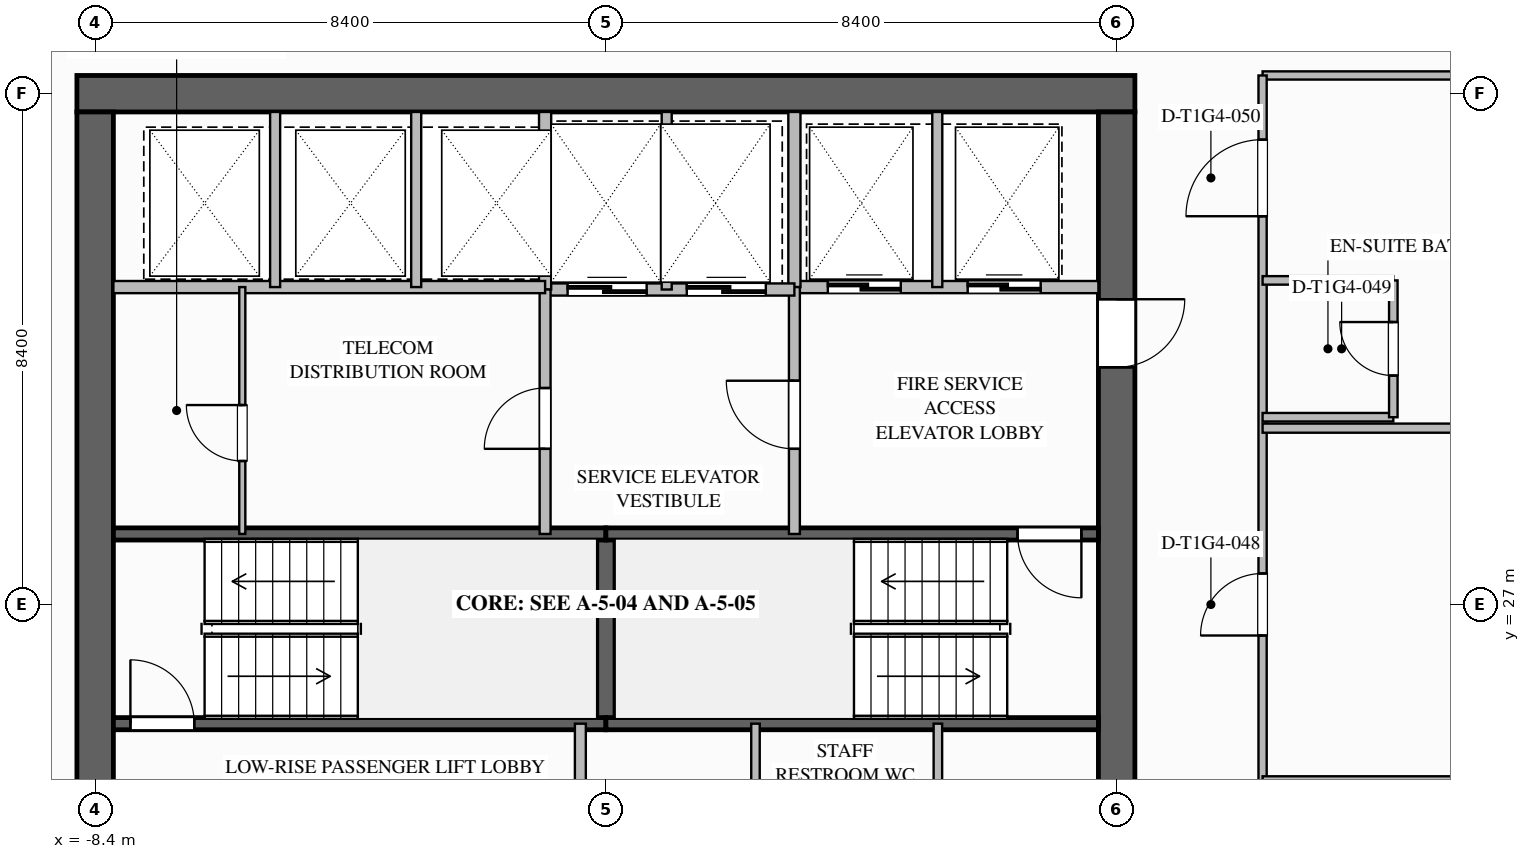
"""IFC4 building model, lengths in metres.
Left out: names, types, materials, properties, quantities, classifications, styles, units other than length and angle.
Written with IfcOpenShell. Run it as: python <this file> out.ifc"""

import sys

from ifc_helpers import new_model, si_unit, direction, frame, frame_2d, origin, place, context, subcontext, project, spatial, rectangle, extrude, element, fill, save


model = new_model("IFC4")
c1 = context("Model", 3, precision=1e-05, world=origin(), true_north=direction((0.0, 1.0)))
c2 = subcontext(c1, "Body", "Model", "MODEL_VIEW")
j1 = project(units=[si_unit("LENGTHUNIT", "METRE"), si_unit("PLANEANGLEUNIT", "RADIAN")], contexts=[c1])
p1 = place(None, origin())
s1 = spatial("IfcSite", under=j1, at=p1, CompositionType="ELEMENT")
p2 = place(p1, origin())
s2 = spatial("IfcBuilding", under=s1, at=p2, CompositionType="ELEMENT")
p3 = place(p2, frame((0.0, 0.0, 64.7)))
s3 = spatial("IfcBuildingStorey", under=s2, at=p3, CompositionType="ELEMENT", Elevation=64.7)
p4 = place(p3, frame((-8.7, 35.4, 0.0), z_axis=(0.0, 0.0, 1.0), x_axis=(1.0, 0.0, 0.0)))
e1 = element("IfcWall", 1, at=p4, inside=s3, PredefinedType="SHEAR", context=c2, shape_type="SweptSolid", body=[
    extrude(rectangle(XDim=17.4, YDim=0.6, at=frame_2d((8.7, 0.0))), origin(), (0.0, 0.0, 1.0), 3.5),
])
p5 = place(p3, frame((8.4, 35.1, 0.0), z_axis=(0.0, 0.0, 1.0), x_axis=(0.0, -1.0, 0.0)))
e2 = element("IfcWall", 2, at=p5, inside=s3, PredefinedType="SHEAR", context=c2, shape_type="SweptSolid", body=[
    extrude(rectangle(XDim=16.2, YDim=0.6, at=frame_2d((8.1, 0.0))), origin(), (0.0, 0.0, 1.0), 3.5),
])
p6 = place(p5, frame((3.08, 0.0, 0.0)))
e3 = element("IfcOpeningElement", 3, at=p6, cuts=e2, PredefinedType="OPENING", context=c2, shape_type="SweptSolid", body=[
    extrude(rectangle(XDim=1.12, YDim=2.1, at=frame_2d((0.56, 1.05))), frame((0.0, 0.31, 0.0), z_axis=(0.0, -1.0, 0.0), x_axis=(1.0, 0.0, 0.0)), (0.0, 0.0, 1.0), 0.62),
])
p7 = place(p3, frame((-8.4, 18.9, 0.0), z_axis=(0.0, 0.0, 1.0), x_axis=(0.0, 1.0, 0.0)))
e4 = element("IfcWall", 4, at=p7, inside=s3, PredefinedType="SHEAR", context=c2, shape_type="SweptSolid", body=[
    extrude(rectangle(XDim=16.2, YDim=0.6, at=frame_2d((8.1, 0.0))), origin(), (0.0, 0.0, 1.0), 3.5),
])
p8 = place(p7, frame((3.9, 0.0, 0.0)))
e5 = element("IfcOpeningElement", 5, at=p8, cuts=e4, PredefinedType="OPENING", context=c2, shape_type="SweptSolid", body=[
    extrude(rectangle(XDim=1.08, YDim=2.04, at=frame_2d((0.54, 1.02))), frame((0.0, 0.31, 0.0), z_axis=(0.0, -1.0, 0.0), x_axis=(1.0, 0.0, 0.0)), (0.0, 0.0, 1.0), 0.62),
])
p9 = place(p3, frame((0.0, 25.04, 0.0), z_axis=(0.0, 0.0, 1.0), x_axis=(0.0, 1.0, 0.0)))
e6 = element("IfcWall", 6, at=p9, inside=s3, PredefinedType="SOLIDWALL", context=c2, shape_type="SweptSolid", body=[
    extrude(rectangle(XDim=3.12, YDim=0.3, at=frame_2d((1.56, 0.0))), origin(), (0.0, 0.0, 1.0), 3.24),
])
p10 = place(p3, frame((-8.1, 25.04, 0.0), z_axis=(0.0, 0.0, 1.0), x_axis=(1.0, 0.0, 0.0)))
e7 = element("IfcWall", 7, at=p10, inside=s3, PredefinedType="SOLIDWALL", context=c2, shape_type="SweptSolid", body=[
    extrude(rectangle(XDim=8.1, YDim=0.2, at=frame_2d((4.05, 0.0))), origin(), (0.0, 0.0, 1.0), 3.24),
])
p11 = place(p10, frame((0.28, 0.0, 0.0)))
e8 = element("IfcOpeningElement", 8, at=p11, cuts=e7, PredefinedType="OPENING", context=c2, shape_type="SweptSolid", body=[
    extrude(rectangle(XDim=1.05, YDim=2.1, at=frame_2d((0.525, 1.05))), frame((0.0, 0.11, 0.0), z_axis=(0.0, -1.0, 0.0), x_axis=(1.0, 0.0, 0.0)), (0.0, 0.0, 1.0), 0.22),
])
for number, where, z_axis, x_axis in (
    (9, (-8.1, 28.16, 0.0), (0.0, 0.0, 1.0), (1.0, 0.0, 0.0)),
    (10, (0.0, 25.04, 0.0), (0.0, 0.0, 1.0), (1.0, 0.0, 0.0)),
):
    element("IfcWall", number, at=place(p3, frame(where, z_axis=z_axis, x_axis=x_axis)), inside=s3, PredefinedType="SOLIDWALL", context=c2, shape_type="SweptSolid", body=[
        extrude(rectangle(XDim=8.1, YDim=0.2, at=frame_2d((4.05, 0.0))), origin(), (0.0, 0.0, 1.0), 3.24),
    ])
p12 = place(p3, frame((8.1, 28.16, 0.0), z_axis=(0.0, 0.0, 1.0), x_axis=(-1.0, 0.0, 0.0)))
e11 = element("IfcWall", 11, at=p12, inside=s3, PredefinedType="SOLIDWALL", context=c2, shape_type="SweptSolid", body=[
    extrude(rectangle(XDim=8.1, YDim=0.2, at=frame_2d((4.05, 0.0))), origin(), (0.0, 0.0, 1.0), 3.24),
])
p13 = place(p12, frame((0.28, 0.0, 0.0)))
e12 = element("IfcOpeningElement", 12, at=p13, cuts=e11, PredefinedType="OPENING", context=c2, shape_type="SweptSolid", body=[
    extrude(rectangle(XDim=1.05, YDim=2.1, at=frame_2d((0.525, 1.05))), frame((0.0, 0.11, 0.0), z_axis=(0.0, -1.0, 0.0), x_axis=(1.0, 0.0, 0.0)), (0.0, 0.0, 1.0), 0.22),
])
p14 = place(p3, frame((3.1, 32.22, 0.0), z_axis=(0.0, 0.0, 1.0), x_axis=(1.0, 0.0, 0.0)))
e13 = element("IfcWall", 13, at=p14, inside=s3, PredefinedType="SOLIDWALL", context=c2, shape_type="SweptSolid", body=[
    extrude(rectangle(XDim=5.0, YDim=0.2, at=frame_2d((2.5, 0.0))), origin(), (0.0, 0.0, 1.0), 3.24),
])
p15 = place(p14, frame((0.55, 0.0, 0.0)))
e14 = element("IfcOpeningElement", 14, at=p15, cuts=e13, PredefinedType="OPENING", context=c2, shape_type="SweptSolid", body=[
    extrude(rectangle(XDim=1.2, YDim=2.2, at=frame_2d((0.6, 1.1))), frame((0.0, 0.11, 0.0), z_axis=(0.0, -1.0, 0.0), x_axis=(1.0, 0.0, 0.0)), (0.0, 0.0, 1.0), 0.22),
])
p16 = place(p14, frame((2.85, 0.0, 0.0)))
e15 = element("IfcOpeningElement", 15, at=p16, cuts=e13, PredefinedType="OPENING", context=c2, shape_type="SweptSolid", body=[
    extrude(rectangle(XDim=1.2, YDim=2.2, at=frame_2d((0.6, 1.1))), frame((0.0, 0.11, 0.0), z_axis=(0.0, -1.0, 0.0), x_axis=(1.0, 0.0, 0.0)), (0.0, 0.0, 1.0), 0.22),
])
p17 = place(p3, frame((3.1, 32.22, 0.0), z_axis=(0.0, 0.0, 1.0), x_axis=(0.0, 1.0, 0.0)))
e16 = element("IfcWall", 16, at=p17, inside=s3, PredefinedType="SOLIDWALL", context=c2, shape_type="SweptSolid", body=[
    extrude(rectangle(XDim=2.88, YDim=0.2, at=frame_2d((1.44, 0.0))), origin(), (0.0, 0.0, 1.0), 3.24),
])
p18 = place(p3, frame((5.45, 32.22, 0.0), z_axis=(0.0, 0.0, 1.0), x_axis=(0.0, 1.0, 0.0)))
e17 = element("IfcWall", 17, at=p18, inside=s3, PredefinedType="PARTITIONING", context=c2, shape_type="SweptSolid", body=[
    extrude(rectangle(XDim=2.88, YDim=0.165, at=frame_2d((1.44, 0.0))), origin(), (0.0, 0.0, 1.0), 3.24),
])
p19 = place(p3, frame((3.1, 28.16, 0.0), z_axis=(0.0, 0.0, 1.0), x_axis=(0.0, 1.0, 0.0)))
e18 = element("IfcWall", 18, at=p19, inside=s3, PredefinedType="SOLIDWALL", context=c2, shape_type="SweptSolid", body=[
    extrude(rectangle(XDim=4.06, YDim=0.18, at=frame_2d((2.03, 0.0))), origin(), (0.0, 0.0, 1.0), 3.24),
])
p20 = place(p19, frame((1.4, 0.0, 0.0)))
e19 = element("IfcOpeningElement", 19, at=p20, cuts=e18, PredefinedType="OPENING", context=c2, shape_type="SweptSolid", body=[
    extrude(rectangle(XDim=1.12, YDim=2.1, at=frame_2d((0.56, 1.05))), frame((0.0, 0.1, 0.0), z_axis=(0.0, -1.0, 0.0), x_axis=(1.0, 0.0, 0.0)), (0.0, 0.0, 1.0), 0.2),
])
p21 = place(p3, frame((-1.0, 32.18, 0.0), z_axis=(0.0, 0.0, 1.0), x_axis=(1.0, 0.0, 0.0)))
e20 = element("IfcWall", 20, at=p21, inside=s3, PredefinedType="SOLIDWALL", context=c2, shape_type="SweptSolid", body=[
    extrude(rectangle(XDim=4.1, YDim=0.2, at=frame_2d((2.05, 0.0))), origin(), (0.0, 0.0, 1.0), 3.24),
])
p22 = place(p21, frame((0.37, 0.0, 0.0)))
e21 = element("IfcOpeningElement", 21, at=p22, cuts=e20, PredefinedType="OPENING", context=c2, shape_type="SweptSolid", body=[
    extrude(rectangle(XDim=1.3, YDim=2.2, at=frame_2d((0.65, 1.1))), frame((0.0, 0.11, 0.0), z_axis=(0.0, -1.0, 0.0), x_axis=(1.0, 0.0, 0.0)), (0.0, 0.0, 1.0), 0.22),
])
p23 = place(p21, frame((2.33, 0.0, 0.0)))
e22 = element("IfcOpeningElement", 22, at=p23, cuts=e20, PredefinedType="OPENING", context=c2, shape_type="SweptSolid", body=[
    extrude(rectangle(XDim=1.3, YDim=2.2, at=frame_2d((0.65, 1.1))), frame((0.0, 0.11, 0.0), z_axis=(0.0, -1.0, 0.0), x_axis=(1.0, 0.0, 0.0)), (0.0, 0.0, 1.0), 0.22),
])
p24 = place(p3, frame((-1.0, 32.18, 0.0), z_axis=(0.0, 0.0, 1.0), x_axis=(0.0, 1.0, 0.0)))
e23 = element("IfcWall", 23, at=p24, inside=s3, PredefinedType="SOLIDWALL", context=c2, shape_type="SweptSolid", body=[
    extrude(rectangle(XDim=2.92, YDim=0.2, at=frame_2d((1.46, 0.0))), origin(), (0.0, 0.0, 1.0), 3.24),
])
p25 = place(p3, frame((1.0, 32.18, 0.0), z_axis=(0.0, 0.0, 1.0), x_axis=(0.0, 1.0, 0.0)))
e24 = element("IfcWall", 24, at=p25, inside=s3, PredefinedType="PARTITIONING", context=c2, shape_type="SweptSolid", body=[
    extrude(rectangle(XDim=2.92, YDim=0.165, at=frame_2d((1.46, 0.0))), origin(), (0.0, 0.0, 1.0), 3.24),
])
p26 = place(p3, frame((-1.0, 28.16, 0.0), z_axis=(0.0, 0.0, 1.0), x_axis=(0.0, 1.0, 0.0)))
e25 = element("IfcWall", 25, at=p26, inside=s3, PredefinedType="SOLIDWALL", context=c2, shape_type="SweptSolid", body=[
    extrude(rectangle(XDim=4.02, YDim=0.18, at=frame_2d((2.01, 0.0))), origin(), (0.0, 0.0, 1.0), 3.24),
])
p27 = place(p26, frame((1.4, 0.0, 0.0)))
e26 = element("IfcOpeningElement", 26, at=p27, cuts=e25, PredefinedType="OPENING", context=c2, shape_type="SweptSolid", body=[
    extrude(rectangle(XDim=1.0, YDim=2.1, at=frame_2d((0.5, 1.05))), frame((0.0, 0.1, 0.0), z_axis=(0.0, -1.0, 0.0), x_axis=(1.0, 0.0, 0.0)), (0.0, 0.0, 1.0), 0.2),
])
p28 = place(p3, frame((-8.1, 32.22, 0.0), z_axis=(0.0, 0.0, 1.0), x_axis=(1.0, 0.0, 0.0)))
e27 = element("IfcWall", 27, at=p28, inside=s3, PredefinedType="SOLIDWALL", context=c2, shape_type="SweptSolid", body=[
    extrude(rectangle(XDim=7.1, YDim=0.2, at=frame_2d((3.55, 0.0))), origin(), (0.0, 0.0, 1.0), 3.24),
])
for number, where, z_axis, x_axis in (
    (28, (-5.44, 32.22, 0.0), (0.0, 0.0, 1.0), (0.0, 1.0, 0.0)),
    (29, (-3.12, 32.22, 0.0), (0.0, 0.0, 1.0), (0.0, 1.0, 0.0)),
):
    element("IfcWall", number, at=place(p3, frame(where, z_axis=z_axis, x_axis=x_axis)), inside=s3, PredefinedType="PARTITIONING", context=c2, shape_type="SweptSolid", body=[
        extrude(rectangle(XDim=2.88, YDim=0.165, at=frame_2d((1.44, 0.0))), origin(), (0.0, 0.0, 1.0), 3.24),
    ])
p29 = place(p3, frame((-5.98, 28.16, 0.0), z_axis=(0.0, 0.0, 1.0), x_axis=(0.0, 1.0, 0.0)))
e30 = element("IfcWall", 30, at=p29, inside=s3, PredefinedType="PARTITIONING", context=c2, shape_type="SweptSolid", body=[
    extrude(rectangle(XDim=4.06, YDim=0.1, at=frame_2d((2.03, 0.0))), origin(), (0.0, 0.0, 1.0), 3.24),
])
p30 = place(p29, frame((1.2, 0.0, 0.0)))
e31 = element("IfcOpeningElement", 31, at=p30, cuts=e30, PredefinedType="OPENING", context=c2, shape_type="SweptSolid", body=[
    extrude(rectangle(XDim=0.92, YDim=2.1, at=frame_2d((0.46, 1.05))), frame((0.0, 0.06, 0.0), z_axis=(0.0, -1.0, 0.0), x_axis=(1.0, 0.0, 0.0)), (0.0, 0.0, 1.0), 0.12),
])
p31 = place(p3, frame((-0.42, 21.78, 0.0), z_axis=(0.0, 0.0, 1.0), x_axis=(0.0, 1.0, 0.0)))
e32 = element("IfcWall", 32, at=p31, inside=s3, PredefinedType="SOLIDWALL", context=c2, shape_type="SweptSolid", body=[
    extrude(rectangle(XDim=3.26, YDim=0.18, at=frame_2d((1.63, 0.0))), origin(), (0.0, 0.0, 1.0), 3.24),
])
p32 = place(p31, frame((1.1, 0.0, 0.0)))
e33 = element("IfcOpeningElement", 33, at=p32, cuts=e32, PredefinedType="OPENING", context=c2, shape_type="SweptSolid", body=[
    extrude(rectangle(XDim=1.0, YDim=2.1, at=frame_2d((0.5, 1.05))), frame((0.0, 0.1, 0.0), z_axis=(0.0, -1.0, 0.0), x_axis=(1.0, 0.0, 0.0)), (0.0, 0.0, 1.0), 0.2),
])
p33 = place(p3, frame((2.46, 21.78, 0.0), z_axis=(0.0, 0.0, 1.0), x_axis=(0.0, 1.0, 0.0)))
e34 = element("IfcWall", 34, at=p33, inside=s3, PredefinedType="PLUMBINGWALL", context=c2, shape_type="SweptSolid", body=[
    extrude(rectangle(XDim=3.26, YDim=0.14, at=frame_2d((1.63, 0.0))), origin(), (0.0, 0.0, 1.0), 3.24),
])
p34 = place(p33, frame((1.0, 0.0, 0.0)))
e35 = element("IfcOpeningElement", 35, at=p34, cuts=e34, PredefinedType="OPENING", context=c2, shape_type="SweptSolid", body=[
    extrude(rectangle(XDim=0.92, YDim=2.1, at=frame_2d((0.46, 1.05))), frame((0.0, 0.08, 0.0), z_axis=(0.0, -1.0, 0.0), x_axis=(1.0, 0.0, 0.0)), (0.0, 0.0, 1.0), 0.16),
])
p35 = place(p3, frame((5.46, 21.78, 0.0), z_axis=(0.0, 0.0, 1.0), x_axis=(0.0, 1.0, 0.0)))
e36 = element("IfcWall", 36, at=p35, inside=s3, PredefinedType="PLUMBINGWALL", context=c2, shape_type="SweptSolid", body=[
    extrude(rectangle(XDim=3.26, YDim=0.14, at=frame_2d((1.63, 0.0))), origin(), (0.0, 0.0, 1.0), 3.24),
])
p36 = place(p35, frame((1.0, 0.0, 0.0)))
e37 = element("IfcOpeningElement", 37, at=p36, cuts=e36, PredefinedType="OPENING", context=c2, shape_type="SweptSolid", body=[
    extrude(rectangle(XDim=0.92, YDim=2.1, at=frame_2d((0.46, 1.05))), frame((0.0, 0.08, 0.0), z_axis=(0.0, -1.0, 0.0), x_axis=(1.0, 0.0, 0.0)), (0.0, 0.0, 1.0), 0.16),
])
p37 = place(p3, frame((10.8, 35.7, 0.0), z_axis=(0.0, 0.0, 1.0), x_axis=(1.0, 0.0, 0.0)))
e38 = element("IfcWall", 38, at=p37, inside=s3, PredefinedType="PARTITIONING", context=c2, shape_type="SweptSolid", body=[
    extrude(rectangle(XDim=5.4, YDim=0.135, at=frame_2d((2.7, 0.0))), origin(), (0.0, 0.0, 1.0), 3.24),
])
p38 = place(p3, frame((10.8, 18.3, 0.0), z_axis=(0.0, 0.0, 1.0), x_axis=(0.0, 1.0, 0.0)))
e39 = element("IfcWall", 39, at=p38, inside=s3, PredefinedType="PARTITIONING", context=c2, shape_type="SweptSolid", body=[
    extrude(rectangle(XDim=17.4, YDim=0.135, at=frame_2d((8.7, 0.0))), origin(), (0.0, 0.0, 1.0), 3.24),
])
p39 = place(p38, frame((3.485, 0.0, 0.0)))
e40 = element("IfcOpeningElement", 40, at=p39, cuts=e39, PredefinedType="OPENING", context=c2, shape_type="SweptSolid", body=[
    extrude(rectangle(XDim=1.26, YDim=2.2, at=frame_2d((0.63, 1.1))), frame((0.0, 0.077, 0.0), z_axis=(0.0, -1.0, 0.0), x_axis=(1.0, 0.0, 0.0)), (0.0, 0.0, 1.0), 0.155),
])
p40 = place(p38, frame((8.19, 0.0, 0.0)))
e41 = element("IfcOpeningElement", 41, at=p40, cuts=e39, PredefinedType="OPENING", context=c2, shape_type="SweptSolid", body=[
    extrude(rectangle(XDim=1.02, YDim=2.15, at=frame_2d((0.51, 1.075))), frame((0.0, 0.077, 0.0), z_axis=(0.0, -1.0, 0.0), x_axis=(1.0, 0.0, 0.0)), (0.0, 0.0, 1.0), 0.155),
])
p41 = place(p38, frame((15.085, 0.0, 0.0)))
e42 = element("IfcOpeningElement", 42, at=p41, cuts=e39, PredefinedType="OPENING", context=c2, shape_type="SweptSolid", body=[
    extrude(rectangle(XDim=1.26, YDim=2.2, at=frame_2d((0.63, 1.1))), frame((0.0, 0.077, 0.0), z_axis=(0.0, -1.0, 0.0), x_axis=(1.0, 0.0, 0.0)), (0.0, 0.0, 1.0), 0.155),
])
for number, where, z_axis, x_axis in (
    (43, (10.8, 24.1, 0.0), (0.0, 0.0, 1.0), (1.0, 0.0, 0.0)),
    (44, (10.8, 29.9, 0.0), (0.0, 0.0, 1.0), (1.0, 0.0, 0.0)),
):
    element("IfcWall", number, at=place(p3, frame(where, z_axis=z_axis, x_axis=x_axis)), inside=s3, PredefinedType="PARTITIONING", context=c2, shape_type="SweptSolid", body=[
        extrude(rectangle(XDim=15.4, YDim=0.15, at=frame_2d((7.7, 0.0))), origin(), (0.0, 0.0, 1.0), 3.24),
    ])
for number, where, z_axis, x_axis in (
    (45, (10.8, 30.08, 0.0), (0.0, 0.0, 1.0), (1.0, 0.0, 0.0)),
    (46, (10.8, 32.33, 0.0), (0.0, 0.0, 1.0), (1.0, 0.0, 0.0)),
):
    element("IfcWall", number, at=place(p3, frame(where, z_axis=z_axis, x_axis=x_axis)), inside=s3, PredefinedType="PLUMBINGWALL", context=c2, shape_type="SweptSolid", body=[
        extrude(rectangle(XDim=2.15, YDim=0.14, at=frame_2d((1.075, 0.0))), origin(), (0.0, 0.0, 1.0), 3.24),
    ])
p42 = place(p3, frame((12.95, 30.08, 0.0), z_axis=(0.0, 0.0, 1.0), x_axis=(0.0, 1.0, 0.0)))
e47 = element("IfcWall", 47, at=p42, inside=s3, PredefinedType="PLUMBINGWALL", context=c2, shape_type="SweptSolid", body=[
    extrude(rectangle(XDim=2.25, YDim=0.14, at=frame_2d((1.125, 0.0))), origin(), (0.0, 0.0, 1.0), 3.24),
])
p43 = place(p42, frame((0.685, 0.0, 0.0)))
e48 = element("IfcOpeningElement", 48, at=p43, cuts=e47, PredefinedType="OPENING", context=c2, shape_type="SweptSolid", body=[
    extrude(rectangle(XDim=0.88, YDim=2.1, at=frame_2d((0.44, 1.05))), frame((0.0, 0.08, 0.0), z_axis=(0.0, -1.0, 0.0), x_axis=(1.0, 0.0, 0.0)), (0.0, 0.0, 1.0), 0.16),
])
p44 = place(p11, origin())
e49 = element("IfcDoor", 49, at=p44, inside=s3, OperationType="SINGLE_SWING_LEFT", PredefinedType="DOOR", context=c2, shape_type="SweptSolid", body=[
    extrude(rectangle(XDim=1.05, YDim=2.1, at=frame_2d((0.525, 1.05))), frame((0.0, 0.025, 0.0), z_axis=(0.0, -1.0, 0.0), x_axis=(1.0, 0.0, 0.0)), (0.0, 0.0, 1.0), 0.05),
])
fill(e8, e49)
p45 = place(p13, origin())
e50 = element("IfcDoor", 50, at=p45, inside=s3, OperationType="SINGLE_SWING_LEFT", PredefinedType="DOOR", context=c2, shape_type="SweptSolid", body=[
    extrude(rectangle(XDim=1.05, YDim=2.1, at=frame_2d((0.525, 1.05))), frame((0.0, 0.025, 0.0), z_axis=(0.0, -1.0, 0.0), x_axis=(1.0, 0.0, 0.0)), (0.0, 0.0, 1.0), 0.05),
])
fill(e12, e50)
p46 = place(p15, origin())
e51 = element("IfcDoor", 51, at=p46, inside=s3, OperationType="SLIDING_TO_LEFT", PredefinedType="DOOR", context=c2, shape_type="SweptSolid", body=[
    extrude(rectangle(XDim=1.2, YDim=2.2, at=frame_2d((0.6, 1.1))), frame((0.0, 0.025, 0.0), z_axis=(0.0, -1.0, 0.0), x_axis=(1.0, 0.0, 0.0)), (0.0, 0.0, 1.0), 0.05),
])
fill(e14, e51)
p47 = place(p16, origin())
e52 = element("IfcDoor", 52, at=p47, inside=s3, OperationType="SLIDING_TO_LEFT", PredefinedType="DOOR", context=c2, shape_type="SweptSolid", body=[
    extrude(rectangle(XDim=1.2, YDim=2.2, at=frame_2d((0.6, 1.1))), frame((0.0, 0.025, 0.0), z_axis=(0.0, -1.0, 0.0), x_axis=(1.0, 0.0, 0.0)), (0.0, 0.0, 1.0), 0.05),
])
fill(e15, e52)
p48 = place(p20, origin())
e53 = element("IfcDoor", 53, at=p48, inside=s3, OperationType="SINGLE_SWING_RIGHT", PredefinedType="DOOR", context=c2, shape_type="SweptSolid", body=[
    extrude(rectangle(XDim=1.12, YDim=2.1, at=frame_2d((0.56, 1.05))), frame((0.0, 0.025, 0.0), z_axis=(0.0, -1.0, 0.0), x_axis=(1.0, 0.0, 0.0)), (0.0, 0.0, 1.0), 0.05),
])
fill(e19, e53)
p49 = place(p6, origin())
e54 = element("IfcDoor", 54, at=p49, inside=s3, OperationType="SINGLE_SWING_LEFT", PredefinedType="DOOR", context=c2, shape_type="SweptSolid", body=[
    extrude(rectangle(XDim=1.12, YDim=2.1, at=frame_2d((0.56, 1.05))), frame((0.0, 0.025, 0.0), z_axis=(0.0, -1.0, 0.0), x_axis=(1.0, 0.0, 0.0)), (0.0, 0.0, 1.0), 0.05),
])
fill(e3, e54)
p50 = place(p22, origin())
e55 = element("IfcDoor", 55, at=p50, inside=s3, OperationType="SLIDING_TO_LEFT", PredefinedType="DOOR", context=c2, shape_type="SweptSolid", body=[
    extrude(rectangle(XDim=1.3, YDim=2.2, at=frame_2d((0.65, 1.1))), frame((0.0, 0.025, 0.0), z_axis=(0.0, -1.0, 0.0), x_axis=(1.0, 0.0, 0.0)), (0.0, 0.0, 1.0), 0.05),
])
fill(e21, e55)
p51 = place(p23, origin())
e56 = element("IfcDoor", 56, at=p51, inside=s3, OperationType="SLIDING_TO_LEFT", PredefinedType="DOOR", context=c2, shape_type="SweptSolid", body=[
    extrude(rectangle(XDim=1.3, YDim=2.2, at=frame_2d((0.65, 1.1))), frame((0.0, 0.025, 0.0), z_axis=(0.0, -1.0, 0.0), x_axis=(1.0, 0.0, 0.0)), (0.0, 0.0, 1.0), 0.05),
])
fill(e22, e56)
p52 = place(p27, origin())
e57 = element("IfcDoor", 57, at=p52, inside=s3, OperationType="SINGLE_SWING_LEFT", PredefinedType="DOOR", context=c2, shape_type="SweptSolid", body=[
    extrude(rectangle(XDim=1.0, YDim=2.1, at=frame_2d((0.5, 1.05))), frame((0.0, 0.025, 0.0), z_axis=(0.0, -1.0, 0.0), x_axis=(1.0, 0.0, 0.0)), (0.0, 0.0, 1.0), 0.05),
])
fill(e26, e57)
p53 = place(p30, origin())
e58 = element("IfcDoor", 58, at=p53, inside=s3, OperationType="SINGLE_SWING_RIGHT", PredefinedType="DOOR", context=c2, shape_type="SweptSolid", body=[
    extrude(rectangle(XDim=0.92, YDim=2.1, at=frame_2d((0.46, 1.05))), frame((0.0, 0.025, 0.0), z_axis=(0.0, -1.0, 0.0), x_axis=(1.0, 0.0, 0.0)), (0.0, 0.0, 1.0), 0.05),
])
fill(e31, e58)
p54 = place(p40, origin())
e59 = element("IfcDoor", 59, at=p54, inside=s3, OperationType="SINGLE_SWING_LEFT", PredefinedType="DOOR", context=c2, shape_type="SweptSolid", body=[
    extrude(rectangle(XDim=1.02, YDim=2.15, at=frame_2d((0.51, 1.075))), frame((0.0, 0.025, 0.0), z_axis=(0.0, -1.0, 0.0), x_axis=(1.0, 0.0, 0.0)), (0.0, 0.0, 1.0), 0.05),
])
fill(e41, e59)
p55 = place(p43, origin())
e60 = element("IfcDoor", 60, at=p55, inside=s3, OperationType="SINGLE_SWING_RIGHT", PredefinedType="DOOR", context=c2, shape_type="SweptSolid", body=[
    extrude(rectangle(XDim=0.88, YDim=2.1, at=frame_2d((0.44, 1.05))), frame((0.0, 0.025, 0.0), z_axis=(0.0, -1.0, 0.0), x_axis=(1.0, 0.0, 0.0)), (0.0, 0.0, 1.0), 0.05),
])
fill(e48, e60)
p56 = place(p41, origin())
e61 = element("IfcDoor", 61, at=p56, inside=s3, OperationType="SINGLE_SWING_LEFT", PredefinedType="DOOR", context=c2, shape_type="SweptSolid", body=[
    extrude(rectangle(XDim=1.26, YDim=2.2, at=frame_2d((0.63, 1.1))), frame((0.0, 0.025, 0.0), z_axis=(0.0, -1.0, 0.0), x_axis=(1.0, 0.0, 0.0)), (0.0, 0.0, 1.0), 0.05),
])
fill(e42, e61)
save(model, sys.argv[1])
